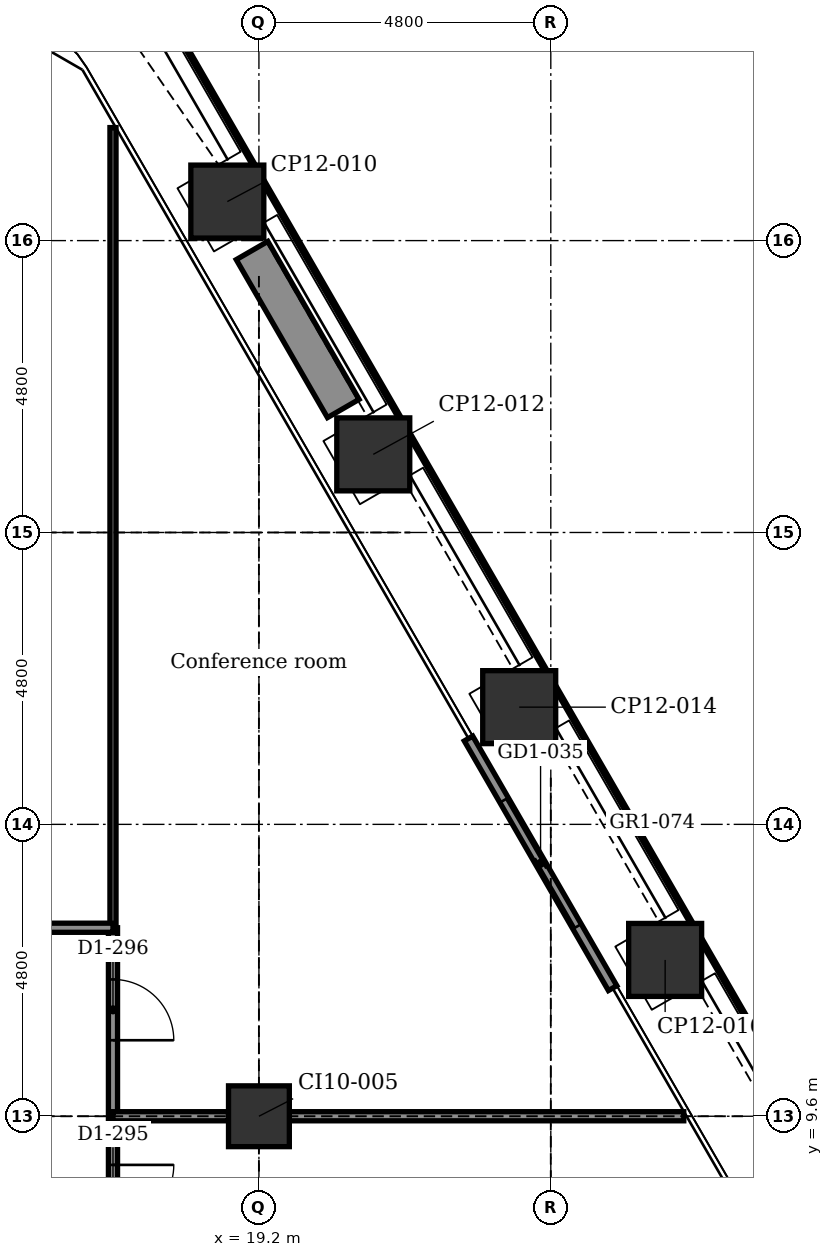
"""IFC4 building model, lengths in metres.
Left out: names, types, materials, properties, quantities, classifications, styles, units other than length and angle.
Written with IfcOpenShell. Run it as: python <this file> out.ifc"""

import sys

from ifc_helpers import new_model, si_unit, direction, frame, frame_2d, origin, origin_2d, place, context, subcontext, project, spatial, rectangle, extrude, element, fill, save


model = new_model("IFC4")
c1 = context("Model", 3, precision=1e-05, world=origin(), true_north=direction((0.0, 1.0)))
c2 = subcontext(c1, "Body", "Model", "MODEL_VIEW")
j1 = project(units=[si_unit("LENGTHUNIT", "METRE"), si_unit("PLANEANGLEUNIT", "RADIAN")], contexts=[c1])
p1 = place(None, origin())
s1 = spatial("IfcSite", under=j1, at=p1, CompositionType="ELEMENT")
p2 = place(p1, origin())
s2 = spatial("IfcBuilding", under=s1, at=p2, CompositionType="ELEMENT")
p3 = place(p2, frame((0.0, 0.0, 109.4)))
s3 = spatial("IfcBuildingStorey", under=s2, at=p3, CompositionType="ELEMENT", Elevation=109.4)
for number, where, z_axis, x_axis in (
    (1, (18.68, 24.642, -0.2), (0.0, 0.0, 1.0), (0.866, 0.5, 0.0)),
    (2, (21.08, 20.485, -0.2), (0.0, 0.0, 1.0), (0.866, 0.5, 0.0)),
    (3, (23.48, 16.328, -0.2), (0.0, 0.0, 1.0), (0.866, 0.5, 0.0)),
    (4, (25.88, 12.171, -0.2), (0.0, 0.0, 1.0), (0.866, 0.5, 0.0)),
):
    element("IfcColumn", number, at=place(p3, frame(where, z_axis=z_axis, x_axis=x_axis)), inside=s3, PredefinedType="COLUMN", context=c2, shape_type="SweptSolid", body=[
        extrude(rectangle(XDim=1.2, YDim=1.2, at=origin_2d()), origin(), (0.0, 0.0, 1.0), 4.5),
    ])
p4 = place(p3, frame((19.2, 9.6, -0.2), z_axis=(0.0, 0.0, 1.0), x_axis=(1.0, 0.0, 0.0)))
e5 = element("IfcColumn", 5, at=p4, inside=s3, PredefinedType="COLUMN", context=c2, shape_type="SweptSolid", body=[
    extrude(rectangle(XDim=1.0, YDim=1.0, at=origin_2d()), origin(), (0.0, 0.0, 1.0), 4.5),
])
p5 = place(p3, frame((22.647, 15.812, 0.0), z_axis=(0.0, 0.0, 1.0), x_axis=(0.499978080042, -0.866038058908, 0.0)))
e6 = element("IfcWall", 6, at=p5, inside=s3, PredefinedType="PARTITIONING", context=c2, shape_type="SweptSolid", body=[
    extrude(rectangle(XDim=4.74, YDim=0.16, at=frame_2d((2.37, 0.0))), origin(), (0.0, 0.0, 1.0), 4.3),
])
p6 = place(p5, frame((1.17, 0.0, 0.0)))
e7 = element("IfcOpeningElement", 7, at=p6, cuts=e6, PredefinedType="OPENING", context=c2, shape_type="SweptSolid", body=[
    extrude(rectangle(XDim=2.4, YDim=2.4, at=frame_2d((1.2, 1.2))), frame((0.0, 0.09, 0.0), z_axis=(0.0, -1.0, 0.0), x_axis=(1.0, 0.0, 0.0)), (0.0, 0.0, 1.0), 0.18),
])
p7 = place(p3, frame((19.087, 23.837, 0.0), z_axis=(0.0, 0.0, 1.0), x_axis=(0.499990139034, -0.866031096941, 0.0)))
e8 = element("IfcWall", 8, at=p7, inside=s3, PredefinedType="USERDEFINED", context=c2, shape_type="SweptSolid", body=[
    extrude(rectangle(XDim=3.0, YDim=0.6, at=frame_2d((1.5, 0.0))), origin(), (0.0, 0.0, 1.0), 0.7),
])
p8 = place(p3, frame((16.8, 12.7, 0.0), z_axis=(0.0, 0.0, 1.0), x_axis=(0.0, 1.0, 0.0)))
e9 = element("IfcWall", 9, at=p8, inside=s3, PredefinedType="PARTITIONING", context=c2, shape_type="SweptSolid", body=[
    extrude(rectangle(XDim=13.158, YDim=0.1, at=frame_2d((6.579, 0.0))), origin(), (0.0, 0.0, 1.0), 4.3),
])
p9 = place(p3, frame((16.8, 3.95, 0.0), z_axis=(0.0, 0.0, 1.0), x_axis=(0.0, 1.0, 0.0)))
e10 = element("IfcWall", 10, at=p9, inside=s3, PredefinedType="PARTITIONING", context=c2, shape_type="SweptSolid", body=[
    extrude(rectangle(XDim=8.75, YDim=0.15, at=frame_2d((4.375, 0.0))), origin(), (0.0, 0.0, 1.0), 4.3),
])
p10 = place(p9, frame((1.275, 0.0, 0.0)))
e11 = element("IfcOpeningElement", 11, at=p10, cuts=e10, PredefinedType="OPENING", context=c2, shape_type="SweptSolid", body=[
    extrude(rectangle(XDim=1.0, YDim=2.1, at=frame_2d((0.5, 1.05))), frame((0.0, 0.085, 0.0), z_axis=(0.0, -1.0, 0.0), x_axis=(1.0, 0.0, 0.0)), (0.0, 0.0, 1.0), 0.17),
])
p11 = place(p9, frame((3.85, 0.0, 0.0)))
e12 = element("IfcOpeningElement", 12, at=p11, cuts=e10, PredefinedType="OPENING", context=c2, shape_type="SweptSolid", body=[
    extrude(rectangle(XDim=1.0, YDim=2.1, at=frame_2d((0.5, 1.05))), frame((0.0, 0.085, 0.0), z_axis=(0.0, -1.0, 0.0), x_axis=(1.0, 0.0, 0.0)), (0.0, 0.0, 1.0), 0.17),
])
p12 = place(p9, frame((6.9, 0.0, 0.0)))
e13 = element("IfcOpeningElement", 13, at=p12, cuts=e10, PredefinedType="OPENING", context=c2, shape_type="SweptSolid", body=[
    extrude(rectangle(XDim=1.0, YDim=2.1, at=frame_2d((0.5, 1.05))), frame((0.0, 0.085, 0.0), z_axis=(0.0, -1.0, 0.0), x_axis=(1.0, 0.0, 0.0)), (0.0, 0.0, 1.0), 0.17),
])
p13 = place(p3, frame((16.8, 9.6, 0.0), z_axis=(0.0, 0.0, 1.0), x_axis=(1.0, 0.0, 0.0)))
e14 = element("IfcWall", 14, at=p13, inside=s3, PredefinedType="PARTITIONING", context=c2, shape_type="SweptSolid", body=[
    extrude(rectangle(XDim=1.9, YDim=0.15, at=frame_2d((0.95, 0.0))), origin(), (0.0, 0.0, 1.0), 3.692),
])
p14 = place(p3, frame((19.7, 9.6, 0.0), z_axis=(0.0, 0.0, 1.0), x_axis=(1.0, 0.0, 0.0)))
e15 = element("IfcWall", 15, at=p14, inside=s3, PredefinedType="PARTITIONING", context=c2, shape_type="SweptSolid", body=[
    extrude(rectangle(XDim=6.487, YDim=0.15, at=frame_2d((3.243, 0.0))), origin(), (0.0, 0.0, 1.0), 3.692),
])
p15 = place(p3, frame((-16.8, 12.7, 0.0), z_axis=(0.0, 0.0, 1.0), x_axis=(1.0, 0.0, 0.0)))
e16 = element("IfcWall", 16, at=p15, inside=s3, PredefinedType="PARTITIONING", context=c2, shape_type="SweptSolid", body=[
    extrude(rectangle(XDim=33.6, YDim=0.15, at=frame_2d((16.8, 0.0))), origin(), (0.0, 0.0, 1.0), 4.3),
])
p16 = place(p15, frame((1.9, 0.0, 0.0)))
e17 = element("IfcOpeningElement", 17, at=p16, cuts=e16, PredefinedType="OPENING", context=c2, shape_type="SweptSolid", body=[
    extrude(rectangle(XDim=1.0, YDim=2.1, at=frame_2d((0.5, 1.05))), frame((0.0, 0.085, 0.0), z_axis=(0.0, -1.0, 0.0), x_axis=(1.0, 0.0, 0.0)), (0.0, 0.0, 1.0), 0.17),
])
p17 = place(p15, frame((5.575, 0.0, 0.0)))
e18 = element("IfcOpeningElement", 18, at=p17, cuts=e16, PredefinedType="OPENING", context=c2, shape_type="SweptSolid", body=[
    extrude(rectangle(XDim=1.0, YDim=2.1, at=frame_2d((0.5, 1.05))), frame((0.0, 0.085, 0.0), z_axis=(0.0, -1.0, 0.0), x_axis=(1.0, 0.0, 0.0)), (0.0, 0.0, 1.0), 0.17),
])
p18 = place(p15, frame((8.665, 0.0, 0.0)))
e19 = element("IfcOpeningElement", 19, at=p18, cuts=e16, PredefinedType="OPENING", context=c2, shape_type="SweptSolid", body=[
    extrude(rectangle(XDim=1.0, YDim=2.1, at=frame_2d((0.5, 1.05))), frame((0.0, 0.085, 0.0), z_axis=(0.0, -1.0, 0.0), x_axis=(1.0, 0.0, 0.0)), (0.0, 0.0, 1.0), 0.17),
])
p19 = place(p15, frame((13.9, 0.0, 0.0)))
e20 = element("IfcOpeningElement", 20, at=p19, cuts=e16, PredefinedType="OPENING", context=c2, shape_type="SweptSolid", body=[
    extrude(rectangle(XDim=1.0, YDim=2.1, at=frame_2d((0.5, 1.05))), frame((0.0, 0.085, 0.0), z_axis=(0.0, -1.0, 0.0), x_axis=(1.0, 0.0, 0.0)), (0.0, 0.0, 1.0), 0.17),
])
p20 = place(p15, frame((18.7, 0.0, 0.0)))
e21 = element("IfcOpeningElement", 21, at=p20, cuts=e16, PredefinedType="OPENING", context=c2, shape_type="SweptSolid", body=[
    extrude(rectangle(XDim=1.0, YDim=2.1, at=frame_2d((0.5, 1.05))), frame((0.0, 0.085, 0.0), z_axis=(0.0, -1.0, 0.0), x_axis=(1.0, 0.0, 0.0)), (0.0, 0.0, 1.0), 0.17),
])
p21 = place(p15, frame((24.515, 0.0, 0.0)))
e22 = element("IfcOpeningElement", 22, at=p21, cuts=e16, PredefinedType="OPENING", context=c2, shape_type="SweptSolid", body=[
    extrude(rectangle(XDim=1.0, YDim=2.1, at=frame_2d((0.5, 1.05))), frame((0.0, 0.085, 0.0), z_axis=(0.0, -1.0, 0.0), x_axis=(1.0, 0.0, 0.0)), (0.0, 0.0, 1.0), 0.17),
])
p22 = place(p15, frame((27.645, 0.0, 0.0)))
e23 = element("IfcOpeningElement", 23, at=p22, cuts=e16, PredefinedType="OPENING", context=c2, shape_type="SweptSolid", body=[
    extrude(rectangle(XDim=1.0, YDim=2.1, at=frame_2d((0.5, 1.05))), frame((0.0, 0.085, 0.0), z_axis=(0.0, -1.0, 0.0), x_axis=(1.0, 0.0, 0.0)), (0.0, 0.0, 1.0), 0.17),
])
p23 = place(p6, origin())
e24 = element("IfcDoor", 24, at=p23, inside=s3, OperationType="DOUBLE_DOOR_SLIDING", PredefinedType="DOOR", context=c2, shape_type="SweptSolid", body=[
    extrude(rectangle(XDim=2.4, YDim=2.4, at=frame_2d((1.2, 1.2))), frame((0.0, 0.025, 0.0), z_axis=(0.0, -1.0, 0.0), x_axis=(1.0, 0.0, 0.0)), (0.0, 0.0, 1.0), 0.05),
])
fill(e7, e24)
p24 = place(p11, frame((1.0, 0.0, 0.0), z_axis=(0.0, 0.0, 1.0), x_axis=(-1.0, 0.0, 0.0)))
e25 = element("IfcDoor", 25, at=p24, inside=s3, OperationType="SINGLE_SWING_RIGHT", PredefinedType="DOOR", context=c2, shape_type="SweptSolid", body=[
    extrude(rectangle(XDim=1.0, YDim=2.1, at=frame_2d((0.5, 1.05))), frame((0.0, 0.025, 0.0), z_axis=(0.0, -1.0, 0.0), x_axis=(1.0, 0.0, 0.0)), (0.0, 0.0, 1.0), 0.05),
])
fill(e12, e25)
p25 = place(p12, frame((1.0, 0.0, 0.0), z_axis=(0.0, 0.0, 1.0), x_axis=(-1.0, 0.0, 0.0)))
e26 = element("IfcDoor", 26, at=p25, inside=s3, OperationType="SINGLE_SWING_LEFT", PredefinedType="DOOR", context=c2, shape_type="SweptSolid", body=[
    extrude(rectangle(XDim=1.0, YDim=2.1, at=frame_2d((0.5, 1.05))), frame((0.0, 0.025, 0.0), z_axis=(0.0, -1.0, 0.0), x_axis=(1.0, 0.0, 0.0)), (0.0, 0.0, 1.0), 0.05),
])
fill(e13, e26)
save(model, sys.argv[1])
